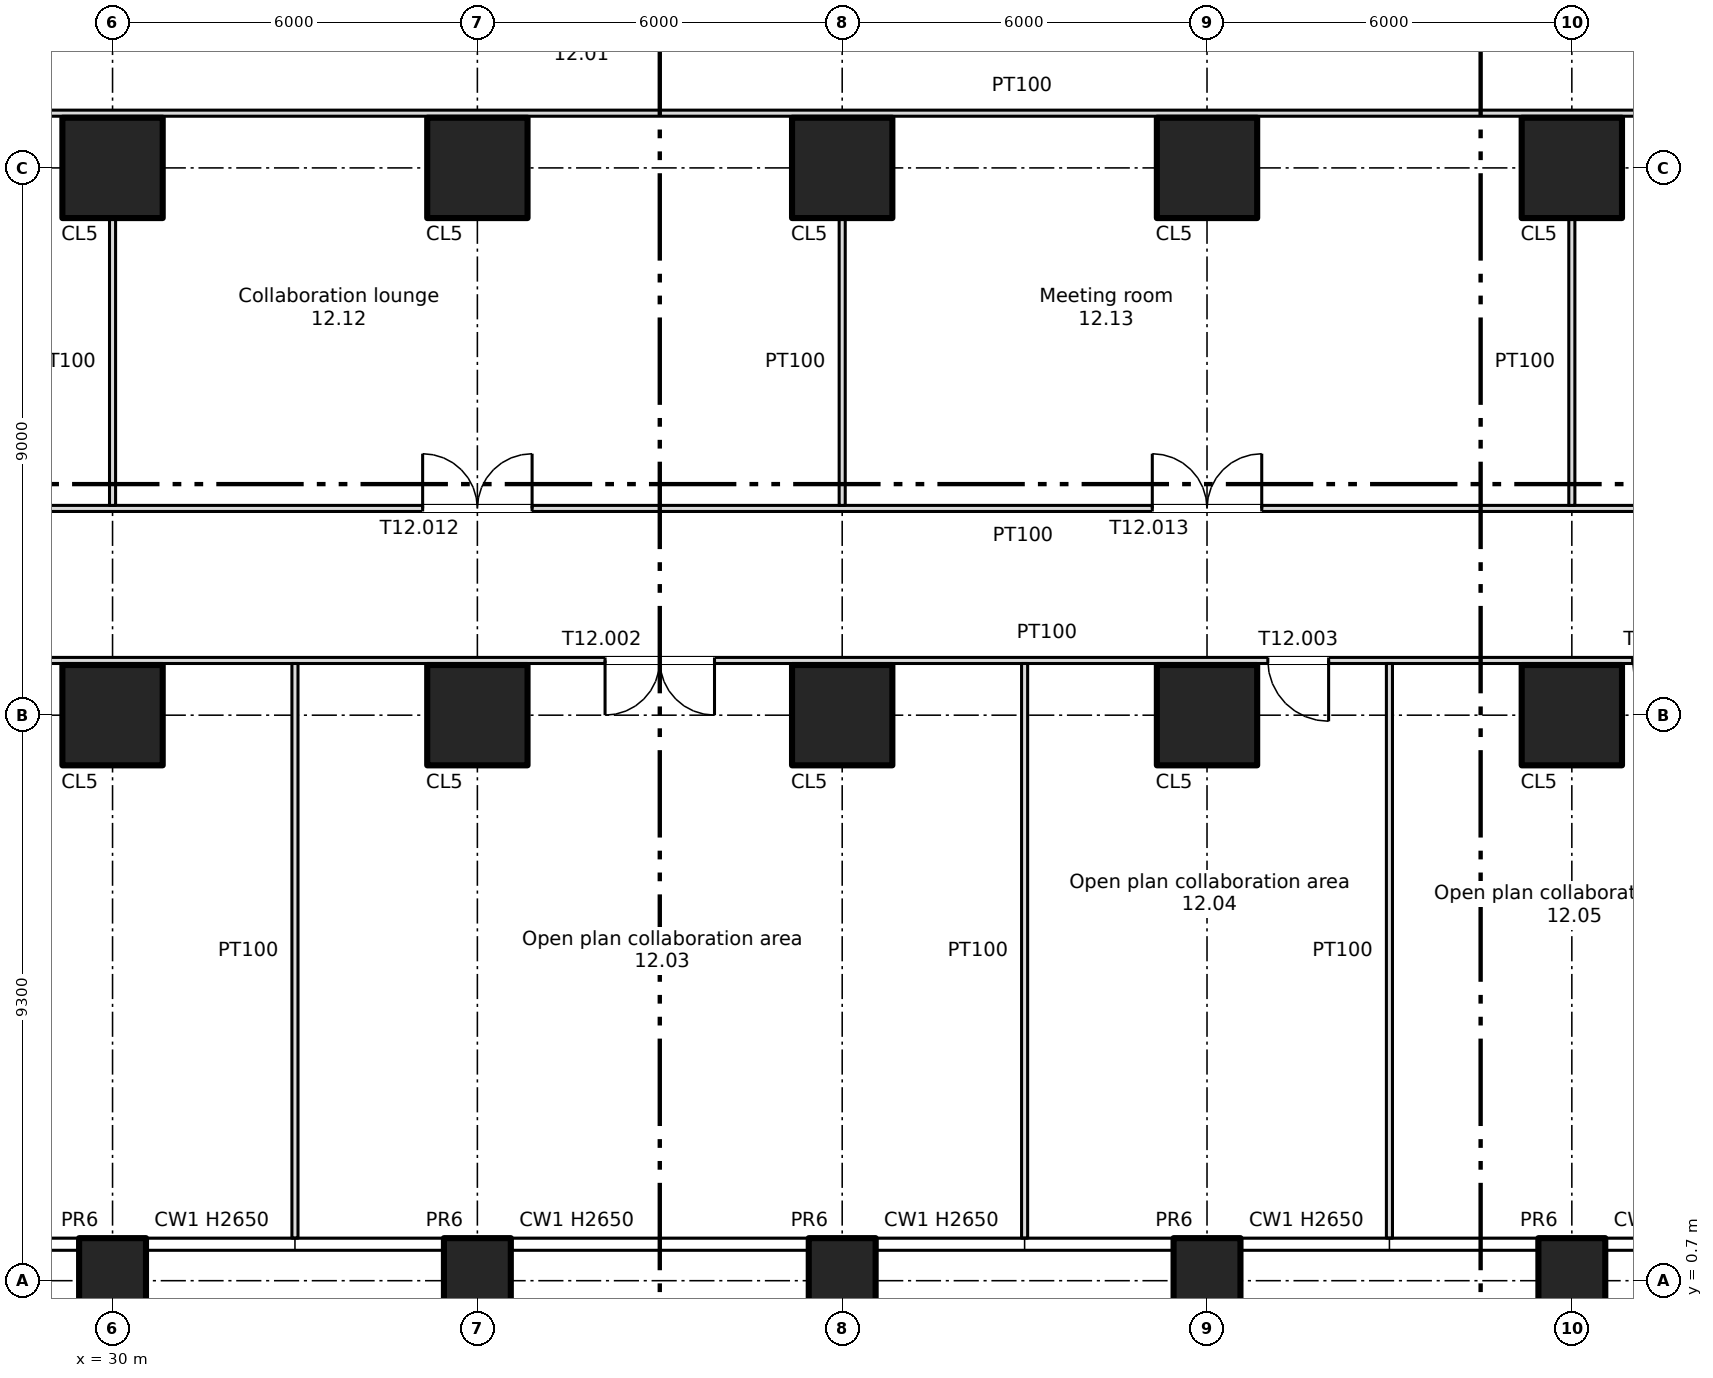
"""IFC4 building model, lengths in metres.
Left out: names, types, materials, properties, quantities, classifications, styles, units other than length and angle.
Written with IfcOpenShell. Run it as: python <this file> out.ifc"""

import sys

from ifc_helpers import new_model, si_unit, direction, frame, frame_2d, origin, origin_2d, place, context, subcontext, project, spatial, rectangle, extrude, element, fill, save


model = new_model("IFC4")
c1 = context("Model", 3, precision=1e-05, world=origin(), true_north=direction((0.0, 1.0)))
c2 = subcontext(c1, "Body", "Model", "MODEL_VIEW")
j1 = project(units=[si_unit("LENGTHUNIT", "METRE"), si_unit("PLANEANGLEUNIT", "RADIAN")], contexts=[c1])
p1 = place(None, origin())
s1 = spatial("IfcSite", under=j1, at=p1, CompositionType="ELEMENT")
p2 = place(p1, origin())
s2 = spatial("IfcBuilding", under=s1, at=p2, CompositionType="ELEMENT")
p3 = place(p2, frame((0.0, 0.0, 60.0)))
s3 = spatial("IfcBuildingStorey", under=s2, at=p3, CompositionType="ELEMENT", Elevation=60.0)
for number, where, z_axis, x_axis in (
    (1, (30.0, 0.7, -0.4), (0.0, 0.0, 1.0), (1.0, 0.0, 0.0)),
    (2, (36.0, 0.7, -0.4), (0.0, 0.0, 1.0), (1.0, 0.0, 0.0)),
    (3, (42.0, 0.7, -0.4), (0.0, 0.0, 1.0), (1.0, 0.0, 0.0)),
    (4, (48.0, 0.7, -0.4), (0.0, 0.0, 1.0), (1.0, 0.0, 0.0)),
    (5, (54.0, 0.7, -0.4), (0.0, 0.0, 1.0), (1.0, 0.0, 0.0)),
):
    element("IfcColumn", number, at=place(p3, frame(where, z_axis=z_axis, x_axis=x_axis)), inside=s3, PredefinedType="COLUMN", context=c2, shape_type="SweptSolid", body=[
        extrude(rectangle(XDim=1.1, YDim=1.4, at=origin_2d()), origin(), (0.0, 0.0, 1.0), 3.75),
    ])
for number, where, z_axis, x_axis in (
    (6, (30.0, 10.0, 0.0), (0.0, 0.0, 1.0), (1.0, 0.0, 0.0)),
    (7, (30.0, 19.0, 0.0), (0.0, 0.0, 1.0), (1.0, 0.0, 0.0)),
    (8, (36.0, 10.0, 0.0), (0.0, 0.0, 1.0), (1.0, 0.0, 0.0)),
    (9, (36.0, 19.0, 0.0), (0.0, 0.0, 1.0), (1.0, 0.0, 0.0)),
    (10, (42.0, 10.0, 0.0), (0.0, 0.0, 1.0), (1.0, 0.0, 0.0)),
    (11, (42.0, 19.0, 0.0), (0.0, 0.0, 1.0), (1.0, 0.0, 0.0)),
    (12, (48.0, 10.0, 0.0), (0.0, 0.0, 1.0), (1.0, 0.0, 0.0)),
    (13, (48.0, 19.0, 0.0), (0.0, 0.0, 1.0), (1.0, 0.0, 0.0)),
    (14, (54.0, 10.0, 0.0), (0.0, 0.0, 1.0), (1.0, 0.0, 0.0)),
    (15, (54.0, 19.0, 0.0), (0.0, 0.0, 1.0), (1.0, 0.0, 0.0)),
):
    element("IfcColumn", number, at=place(p3, frame(where, z_axis=z_axis, x_axis=x_axis)), inside=s3, PredefinedType="COLUMN", context=c2, shape_type="SweptSolid", body=[
        extrude(rectangle(XDim=1.65, YDim=1.65, at=origin_2d()), origin(), (0.0, 0.0, 1.0), 3.35),
    ])
p4 = place(p3, frame((0.8, 10.9, 0.0), z_axis=(0.0, 0.0, 1.0), x_axis=(1.0, 0.0, 0.0)))
e16 = element("IfcWall", 16, at=p4, inside=s3, PredefinedType="PARTITIONING", context=c2, shape_type="SweptSolid", body=[
    extrude(rectangle(XDim=76.4, YDim=0.1, at=frame_2d((38.2, 0.0))), origin(), (0.0, 0.0, 1.0), 3.35),
])
p5 = place(p4, frame((25.3, 0.0, 0.0)))
e17 = element("IfcOpeningElement", 17, at=p5, cuts=e16, PredefinedType="OPENING", context=c2, shape_type="SweptSolid", body=[
    extrude(rectangle(XDim=1.8, YDim=2.1, at=frame_2d((0.9, 1.05))), frame((0.0, 0.06, 0.0), z_axis=(0.0, -1.0, 0.0), x_axis=(1.0, 0.0, 0.0)), (0.0, 0.0, 1.0), 0.12),
])
p6 = place(p4, frame((37.3, 0.0, 0.0)))
e18 = element("IfcOpeningElement", 18, at=p6, cuts=e16, PredefinedType="OPENING", context=c2, shape_type="SweptSolid", body=[
    extrude(rectangle(XDim=1.8, YDim=2.1, at=frame_2d((0.9, 1.05))), frame((0.0, 0.06, 0.0), z_axis=(0.0, -1.0, 0.0), x_axis=(1.0, 0.0, 0.0)), (0.0, 0.0, 1.0), 0.12),
])
p7 = place(p4, frame((48.2, 0.0, 0.0)))
e19 = element("IfcOpeningElement", 19, at=p7, cuts=e16, PredefinedType="OPENING", context=c2, shape_type="SweptSolid", body=[
    extrude(rectangle(XDim=1.0, YDim=2.1, at=frame_2d((0.5, 1.05))), frame((0.0, 0.06, 0.0), z_axis=(0.0, -1.0, 0.0), x_axis=(1.0, 0.0, 0.0)), (0.0, 0.0, 1.0), 0.12),
])
p8 = place(p4, frame((54.2, 0.0, 0.0)))
e20 = element("IfcOpeningElement", 20, at=p8, cuts=e16, PredefinedType="OPENING", context=c2, shape_type="SweptSolid", body=[
    extrude(rectangle(XDim=1.0, YDim=2.1, at=frame_2d((0.5, 1.05))), frame((0.0, 0.06, 0.0), z_axis=(0.0, -1.0, 0.0), x_axis=(1.0, 0.0, 0.0)), (0.0, 0.0, 1.0), 0.12),
])
p9 = place(p4, frame((61.3, 0.0, 0.0)))
e21 = element("IfcOpeningElement", 21, at=p9, cuts=e16, PredefinedType="OPENING", context=c2, shape_type="SweptSolid", body=[
    extrude(rectangle(XDim=1.8, YDim=2.1, at=frame_2d((0.9, 1.05))), frame((0.0, 0.06, 0.0), z_axis=(0.0, -1.0, 0.0), x_axis=(1.0, 0.0, 0.0)), (0.0, 0.0, 1.0), 0.12),
])
p10 = place(p4, frame((2.95, 0.0, 0.0)))
e22 = element("IfcOpeningElement", 22, at=p10, cuts=e16, PredefinedType="OPENING", context=c2, shape_type="SweptSolid", body=[
    extrude(rectangle(XDim=1.2, YDim=2.1, at=frame_2d((0.6, 1.05))), frame((0.0, 0.06, 0.0), z_axis=(0.0, -1.0, 0.0), x_axis=(1.0, 0.0, 0.0)), (0.0, 0.0, 1.0), 0.12),
])
p11 = place(p4, frame((14.55, 0.0, 0.0)))
e23 = element("IfcOpeningElement", 23, at=p11, cuts=e16, PredefinedType="OPENING", context=c2, shape_type="SweptSolid", body=[
    extrude(rectangle(XDim=1.2, YDim=2.1, at=frame_2d((0.6, 1.05))), frame((0.0, 0.06, 0.0), z_axis=(0.0, -1.0, 0.0), x_axis=(1.0, 0.0, 0.0)), (0.0, 0.0, 1.0), 0.12),
])
p12 = place(p4, frame((72.15, 0.0, 0.0)))
e24 = element("IfcOpeningElement", 24, at=p12, cuts=e16, PredefinedType="OPENING", context=c2, shape_type="SweptSolid", body=[
    extrude(rectangle(XDim=1.8, YDim=2.1, at=frame_2d((0.9, 1.05))), frame((0.0, 0.06, 0.0), z_axis=(0.0, -1.0, 0.0), x_axis=(1.0, 0.0, 0.0)), (0.0, 0.0, 1.0), 0.12),
])
p13 = place(p3, frame((3.15, 13.4, 0.0), z_axis=(0.0, 0.0, 1.0), x_axis=(1.0, 0.0, 0.0)))
e25 = element("IfcWall", 25, at=p13, inside=s3, PredefinedType="PARTITIONING", context=c2, shape_type="SweptSolid", body=[
    extrude(rectangle(XDim=71.7, YDim=0.1, at=frame_2d((35.85, 0.0))), origin(), (0.0, 0.0, 1.0), 3.35),
])
p14 = place(p13, frame((9.85, 0.0, 0.0)))
e26 = element("IfcOpeningElement", 26, at=p14, cuts=e25, PredefinedType="OPENING", context=c2, shape_type="SweptSolid", body=[
    extrude(rectangle(XDim=1.0, YDim=2.1, at=frame_2d((0.5, 1.05))), frame((0.0, 0.06, 0.0), z_axis=(0.0, -1.0, 0.0), x_axis=(1.0, 0.0, 0.0)), (0.0, 0.0, 1.0), 0.12),
])
p15 = place(p13, frame((19.95, 0.0, 0.0)))
e27 = element("IfcOpeningElement", 27, at=p15, cuts=e25, PredefinedType="OPENING", context=c2, shape_type="SweptSolid", body=[
    extrude(rectangle(XDim=1.8, YDim=2.1, at=frame_2d((0.9, 1.05))), frame((0.0, 0.06, 0.0), z_axis=(0.0, -1.0, 0.0), x_axis=(1.0, 0.0, 0.0)), (0.0, 0.0, 1.0), 0.12),
])
p16 = place(p13, frame((31.95, 0.0, 0.0)))
e28 = element("IfcOpeningElement", 28, at=p16, cuts=e25, PredefinedType="OPENING", context=c2, shape_type="SweptSolid", body=[
    extrude(rectangle(XDim=1.8, YDim=2.1, at=frame_2d((0.9, 1.05))), frame((0.0, 0.06, 0.0), z_axis=(0.0, -1.0, 0.0), x_axis=(1.0, 0.0, 0.0)), (0.0, 0.0, 1.0), 0.12),
])
p17 = place(p13, frame((43.95, 0.0, 0.0)))
e29 = element("IfcOpeningElement", 29, at=p17, cuts=e25, PredefinedType="OPENING", context=c2, shape_type="SweptSolid", body=[
    extrude(rectangle(XDim=1.8, YDim=2.1, at=frame_2d((0.9, 1.05))), frame((0.0, 0.06, 0.0), z_axis=(0.0, -1.0, 0.0), x_axis=(1.0, 0.0, 0.0)), (0.0, 0.0, 1.0), 0.12),
])
p18 = place(p13, frame((55.95, 0.0, 0.0)))
e30 = element("IfcOpeningElement", 30, at=p18, cuts=e25, PredefinedType="OPENING", context=c2, shape_type="SweptSolid", body=[
    extrude(rectangle(XDim=1.8, YDim=2.1, at=frame_2d((0.9, 1.05))), frame((0.0, 0.06, 0.0), z_axis=(0.0, -1.0, 0.0), x_axis=(1.0, 0.0, 0.0)), (0.0, 0.0, 1.0), 0.12),
])
p19 = place(p13, frame((66.75, 0.0, 0.0)))
e31 = element("IfcOpeningElement", 31, at=p19, cuts=e25, PredefinedType="OPENING", context=c2, shape_type="SweptSolid", body=[
    extrude(rectangle(XDim=1.0, YDim=2.1, at=frame_2d((0.5, 1.05))), frame((0.0, 0.06, 0.0), z_axis=(0.0, -1.0, 0.0), x_axis=(1.0, 0.0, 0.0)), (0.0, 0.0, 1.0), 0.12),
])
p20 = place(p3, frame((3.25, 19.9, 0.0), z_axis=(0.0, 0.0, 1.0), x_axis=(1.0, 0.0, 0.0)))
e32 = element("IfcWall", 32, at=p20, inside=s3, PredefinedType="PARTITIONING", context=c2, shape_type="SweptSolid", body=[
    extrude(rectangle(XDim=71.5, YDim=0.1, at=frame_2d((35.75, 0.0))), origin(), (0.0, 0.0, 1.0), 3.35),
])
p21 = place(p3, frame((30.0, 13.45, 0.0), z_axis=(0.0, 0.0, 1.0), x_axis=(0.0, 1.0, 0.0)))
e33 = element("IfcWall", 33, at=p21, inside=s3, PredefinedType="PARTITIONING", context=c2, shape_type="SweptSolid", body=[
    extrude(rectangle(XDim=4.725, YDim=0.1, at=frame_2d((2.363, 0.0))), origin(), (0.0, 0.0, 1.0), 3.35),
])
p22 = place(p3, frame((33.0, 1.4, 0.0), z_axis=(0.0, 0.0, 1.0), x_axis=(0.0, 1.0, 0.0)))
e34 = element("IfcWall", 34, at=p22, inside=s3, PredefinedType="PARTITIONING", context=c2, shape_type="SweptSolid", body=[
    extrude(rectangle(XDim=9.45, YDim=0.1, at=frame_2d((4.725, 0.0))), origin(), (0.0, 0.0, 1.0), 3.35),
])
p23 = place(p3, frame((42.0, 13.45, 0.0), z_axis=(0.0, 0.0, 1.0), x_axis=(0.0, 1.0, 0.0)))
e35 = element("IfcWall", 35, at=p23, inside=s3, PredefinedType="PARTITIONING", context=c2, shape_type="SweptSolid", body=[
    extrude(rectangle(XDim=4.725, YDim=0.1, at=frame_2d((2.363, 0.0))), origin(), (0.0, 0.0, 1.0), 3.35),
])
for number, where, z_axis, x_axis in (
    (36, (45.0, 1.4, 0.0), (0.0, 0.0, 1.0), (0.0, 1.0, 0.0)),
    (37, (51.0, 1.4, 0.0), (0.0, 0.0, 1.0), (0.0, 1.0, 0.0)),
):
    element("IfcWall", number, at=place(p3, frame(where, z_axis=z_axis, x_axis=x_axis)), inside=s3, PredefinedType="PARTITIONING", context=c2, shape_type="SweptSolid", body=[
        extrude(rectangle(XDim=9.45, YDim=0.1, at=frame_2d((4.725, 0.0))), origin(), (0.0, 0.0, 1.0), 3.35),
    ])
p24 = place(p3, frame((54.0, 13.45, 0.0), z_axis=(0.0, 0.0, 1.0), x_axis=(0.0, 1.0, 0.0)))
e38 = element("IfcWall", 38, at=p24, inside=s3, PredefinedType="PARTITIONING", context=c2, shape_type="SweptSolid", body=[
    extrude(rectangle(XDim=4.725, YDim=0.1, at=frame_2d((2.363, 0.0))), origin(), (0.0, 0.0, 1.0), 3.35),
])
p25 = place(p6, origin())
e39 = element("IfcDoor", 39, at=p25, inside=s3, OperationType="DOUBLE_DOOR_SINGLE_SWING", PredefinedType="DOOR", context=c2, shape_type="SweptSolid", body=[
    extrude(rectangle(XDim=1.8, YDim=2.1, at=frame_2d((0.9, 1.05))), frame((0.0, 0.025, 0.0), z_axis=(0.0, -1.0, 0.0), x_axis=(1.0, 0.0, 0.0)), (0.0, 0.0, 1.0), 0.05),
])
fill(e18, e39)
p26 = place(p7, origin())
e40 = element("IfcDoor", 40, at=p26, inside=s3, OperationType="SINGLE_SWING_RIGHT", PredefinedType="DOOR", context=c2, shape_type="SweptSolid", body=[
    extrude(rectangle(XDim=1.0, YDim=2.1, at=frame_2d((0.5, 1.05))), frame((0.0, 0.025, 0.0), z_axis=(0.0, -1.0, 0.0), x_axis=(1.0, 0.0, 0.0)), (0.0, 0.0, 1.0), 0.05),
])
fill(e19, e40)
p27 = place(p16, origin())
e41 = element("IfcDoor", 41, at=p27, inside=s3, OperationType="DOUBLE_DOOR_SINGLE_SWING", PredefinedType="DOOR", context=c2, shape_type="SweptSolid", body=[
    extrude(rectangle(XDim=1.8, YDim=2.1, at=frame_2d((0.9, 1.05))), frame((0.0, 0.025, 0.0), z_axis=(0.0, -1.0, 0.0), x_axis=(1.0, 0.0, 0.0)), (0.0, 0.0, 1.0), 0.05),
])
fill(e28, e41)
p28 = place(p17, origin())
e42 = element("IfcDoor", 42, at=p28, inside=s3, OperationType="DOUBLE_DOOR_SINGLE_SWING", PredefinedType="DOOR", context=c2, shape_type="SweptSolid", body=[
    extrude(rectangle(XDim=1.8, YDim=2.1, at=frame_2d((0.9, 1.05))), frame((0.0, 0.025, 0.0), z_axis=(0.0, -1.0, 0.0), x_axis=(1.0, 0.0, 0.0)), (0.0, 0.0, 1.0), 0.05),
])
fill(e29, e42)
save(model, sys.argv[1])
